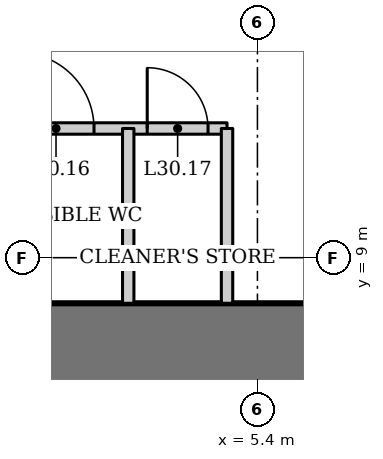
"""IFC4 building model, lengths in metres.
Left out: names, types, materials, properties, quantities, classifications, styles, units other than length and angle.
Written with IfcOpenShell. Run it as: python <this file> out.ifc"""

import sys

from ifc_helpers import new_model, si_unit, direction, frame, frame_2d, origin, place, context, subcontext, project, spatial, rectangle, extrude, element, fill, save


model = new_model("IFC4")
c1 = context("Model", 3, precision=1e-05, world=origin(), true_north=direction((0.0, 1.0)))
c2 = subcontext(c1, "Body", "Model", "MODEL_VIEW")
j1 = project(units=[si_unit("LENGTHUNIT", "METRE"), si_unit("PLANEANGLEUNIT", "RADIAN")], contexts=[c1])
p1 = place(None, origin())
s1 = spatial("IfcSite", under=j1, at=p1, CompositionType="ELEMENT")
p2 = place(p1, origin())
s2 = spatial("IfcBuilding", under=s1, at=p2, CompositionType="ELEMENT")
p3 = place(p2, frame((0.0, 0.0, 130.0)))
s3 = spatial("IfcBuildingStorey", under=s2, at=p3, CompositionType="ELEMENT", Elevation=130.0)
p4 = place(p3, frame((12.2, 7.6, 0.0), z_axis=(0.0, 0.0, 1.0), x_axis=(-1.0, 0.0, 0.0)))
e1 = element("IfcWall", 1, at=p4, inside=s3, PredefinedType="SHEAR", context=c2, shape_type="SweptSolid", body=[
    extrude(rectangle(XDim=24.4, YDim=1.6, at=frame_2d((12.2, 0.0))), origin(), (0.0, 0.0, 1.0), 4.2),
])
p5 = place(p3, frame((-5.0, 10.7, 0.0), z_axis=(0.0, 0.0, 1.0), x_axis=(1.0, 0.0, 0.0)))
e2 = element("IfcWall", 2, at=p5, inside=s3, PredefinedType="SOLIDWALL", context=c2, shape_type="SweptSolid", body=[
    extrude(rectangle(XDim=10.0, YDim=0.15, at=frame_2d((5.0, 0.0))), origin(), (0.0, 0.0, 1.0), 4.05),
])
p6 = place(p5, frame((1.25, 0.0, 0.0)))
e3 = element("IfcOpeningElement", 3, at=p6, cuts=e2, PredefinedType="OPENING", context=c2, shape_type="SweptSolid", body=[
    extrude(rectangle(XDim=0.9, YDim=2.1, at=frame_2d((0.45, 1.05))), frame((0.0, 0.085, 0.0), z_axis=(0.0, -1.0, 0.0), x_axis=(1.0, 0.0, 0.0)), (0.0, 0.0, 1.0), 0.17),
])
p7 = place(p5, frame((4.65, 0.0, 0.0)))
e4 = element("IfcOpeningElement", 4, at=p7, cuts=e2, PredefinedType="OPENING", context=c2, shape_type="SweptSolid", body=[
    extrude(rectangle(XDim=0.9, YDim=2.1, at=frame_2d((0.45, 1.05))), frame((0.0, 0.085, 0.0), z_axis=(0.0, -1.0, 0.0), x_axis=(1.0, 0.0, 0.0)), (0.0, 0.0, 1.0), 0.17),
])
p8 = place(p5, frame((7.25, 0.0, 0.0)))
e5 = element("IfcOpeningElement", 5, at=p8, cuts=e2, PredefinedType="OPENING", context=c2, shape_type="SweptSolid", body=[
    extrude(rectangle(XDim=1.0, YDim=2.1, at=frame_2d((0.5, 1.05))), frame((0.0, 0.085, 0.0), z_axis=(0.0, -1.0, 0.0), x_axis=(1.0, 0.0, 0.0)), (0.0, 0.0, 1.0), 0.17),
])
p9 = place(p5, frame((8.95, 0.0, 0.0)))
e6 = element("IfcOpeningElement", 6, at=p9, cuts=e2, PredefinedType="OPENING", context=c2, shape_type="SweptSolid", body=[
    extrude(rectangle(XDim=0.8, YDim=2.1, at=frame_2d((0.4, 1.05))), frame((0.0, 0.085, 0.0), z_axis=(0.0, -1.0, 0.0), x_axis=(1.0, 0.0, 0.0)), (0.0, 0.0, 1.0), 0.17),
])
for number, where, z_axis, x_axis in (
    (7, (5.0, 8.4, 0.0), (0.0, 0.0, 1.0), (0.0, 1.0, 0.0)),
    (8, (3.7, 8.4, 0.0), (0.0, 0.0, 1.0), (0.0, 1.0, 0.0)),
):
    element("IfcWall", number, at=place(p3, frame(where, z_axis=z_axis, x_axis=x_axis)), inside=s3, PredefinedType="SOLIDWALL", context=c2, shape_type="SweptSolid", body=[
        extrude(rectangle(XDim=2.3, YDim=0.15, at=frame_2d((1.15, 0.0))), origin(), (0.0, 0.0, 1.0), 4.05),
    ])
p10 = place(p8, origin())
e9 = element("IfcDoor", 9, at=p10, inside=s3, OperationType="SINGLE_SWING_LEFT", PredefinedType="DOOR", context=c2, shape_type="SweptSolid", body=[
    extrude(rectangle(XDim=1.0, YDim=2.1, at=frame_2d((0.5, 1.05))), frame((0.0, 0.025, 0.0), z_axis=(0.0, -1.0, 0.0), x_axis=(1.0, 0.0, 0.0)), (0.0, 0.0, 1.0), 0.05),
])
fill(e5, e9)
p11 = place(p9, origin())
e10 = element("IfcDoor", 10, at=p11, inside=s3, OperationType="SINGLE_SWING_LEFT", PredefinedType="DOOR", context=c2, shape_type="SweptSolid", body=[
    extrude(rectangle(XDim=0.8, YDim=2.1, at=frame_2d((0.4, 1.05))), frame((0.0, 0.025, 0.0), z_axis=(0.0, -1.0, 0.0), x_axis=(1.0, 0.0, 0.0)), (0.0, 0.0, 1.0), 0.05),
])
fill(e6, e10)
save(model, sys.argv[1])
